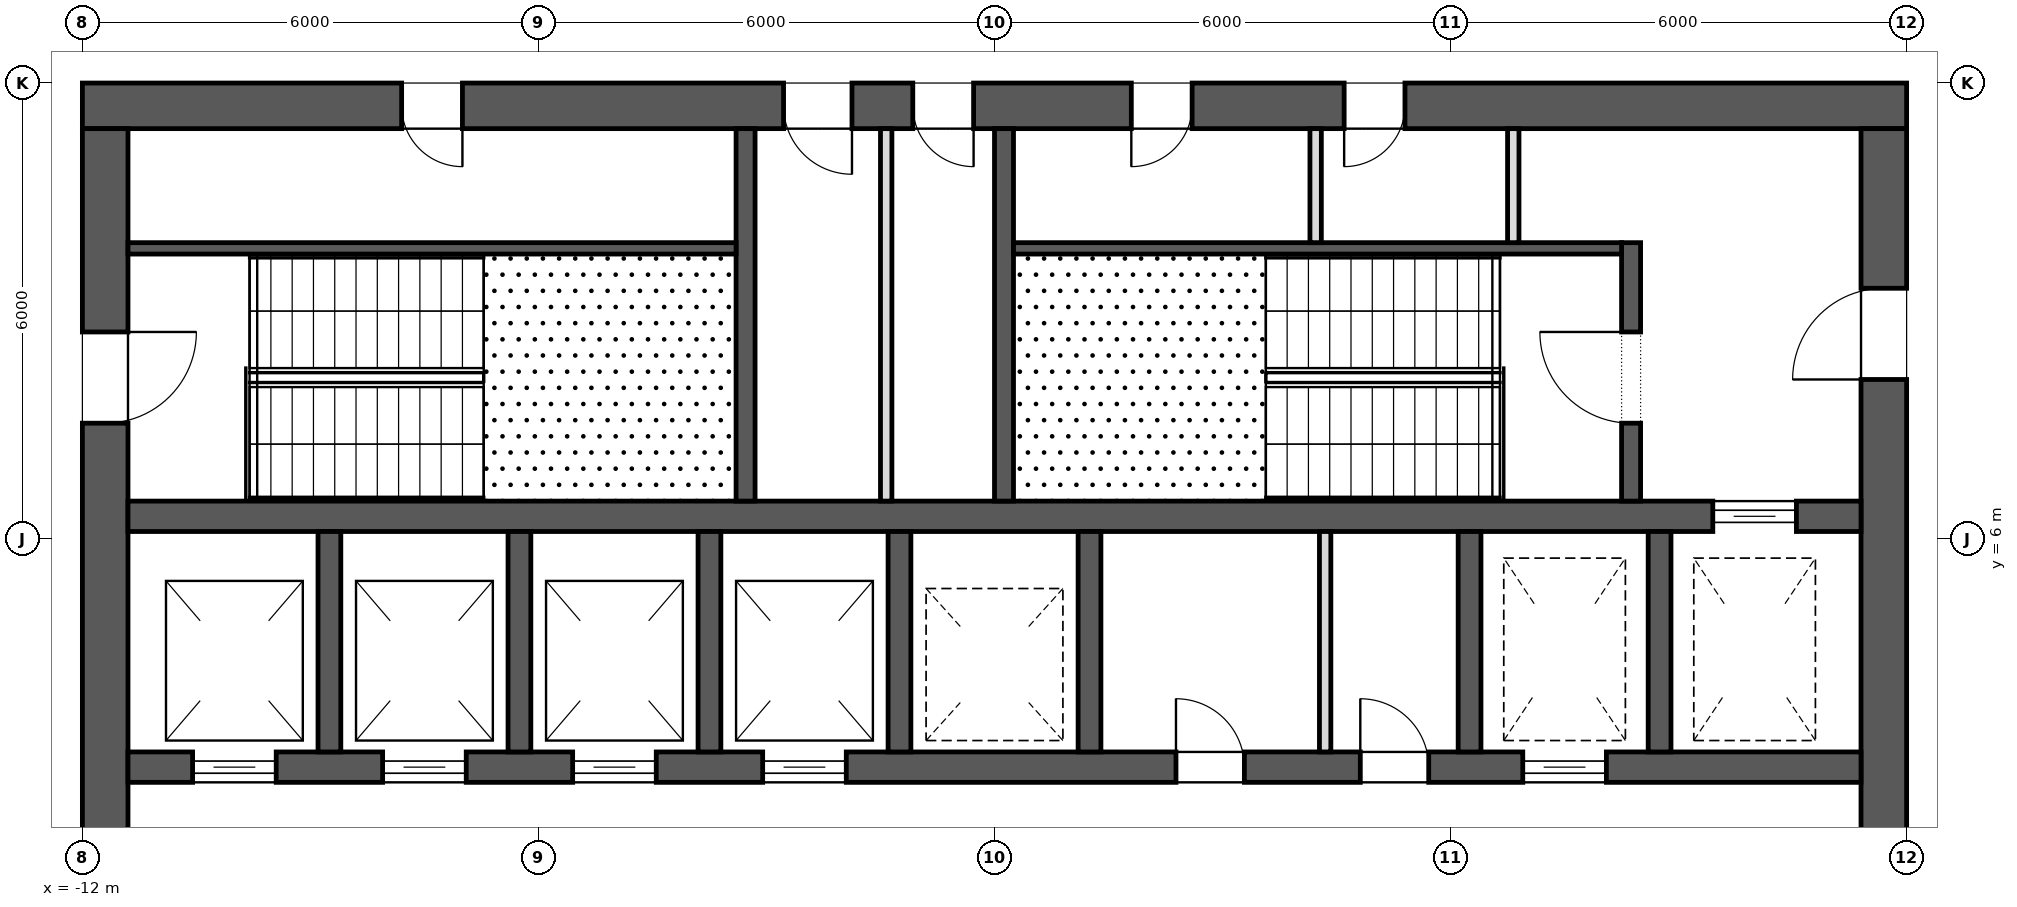
"""IFC4 building model, lengths in metres.
Left out: names, types, materials, properties, quantities, classifications, styles, units other than length and angle.
Written with IfcOpenShell. Run it as: python <this file> out.ifc"""

import sys

from ifc_helpers import new_model, si_unit, direction, frame, frame_2d, origin, place, context, subcontext, project, spatial, rectangle, extrude, element, fill, save


model = new_model("IFC4")
c1 = context("Model", 3, precision=1e-05, world=origin(), true_north=direction((0.0, 1.0)))
c2 = subcontext(c1, "Body", "Model", "MODEL_VIEW")
j1 = project(units=[si_unit("LENGTHUNIT", "METRE"), si_unit("PLANEANGLEUNIT", "RADIAN")], contexts=[c1])
p1 = place(None, origin())
s1 = spatial("IfcSite", under=j1, at=p1, CompositionType="ELEMENT")
p2 = place(p1, origin())
s2 = spatial("IfcBuilding", under=s1, at=p2, CompositionType="ELEMENT")
p3 = place(p2, frame((0.0, 0.0, 226.9)))
s3 = spatial("IfcBuildingStorey", under=s2, at=p3, CompositionType="ELEMENT", Elevation=226.9)
p4 = place(p3, frame((-12.0, 11.7, 0.0), z_axis=(0.0, 0.0, 1.0), x_axis=(1.0, 0.0, 0.0)))
e1 = element("IfcWall", 1, at=p4, inside=s3, PredefinedType="SHEAR", context=c2, shape_type="SweptSolid", body=[
    extrude(rectangle(XDim=24.0, YDim=0.6, at=frame_2d((12.0, 0.0))), origin(), (0.0, 0.0, 1.0), 4.0),
])
p5 = place(p4, frame((9.225, 0.0, 0.0)))
e2 = element("IfcOpeningElement", 2, at=p5, cuts=e1, PredefinedType="OPENING", context=c2, shape_type="SweptSolid", body=[
    extrude(rectangle(XDim=0.9, YDim=2.1, at=frame_2d((0.45, 1.05))), frame((0.0, 0.312, 0.0), z_axis=(0.0, -1.0, 0.0), x_axis=(1.0, 0.0, 0.0)), (0.0, 0.0, 1.0), 0.624),
])
p6 = place(p4, frame((10.925, 0.0, 0.0)))
e3 = element("IfcOpeningElement", 3, at=p6, cuts=e1, PredefinedType="OPENING", context=c2, shape_type="SweptSolid", body=[
    extrude(rectangle(XDim=0.8, YDim=2.1, at=frame_2d((0.4, 1.05))), frame((0.0, 0.312, 0.0), z_axis=(0.0, -1.0, 0.0), x_axis=(1.0, 0.0, 0.0)), (0.0, 0.0, 1.0), 0.624),
])
p7 = place(p4, frame((4.2, 0.0, 0.0)))
e4 = element("IfcOpeningElement", 4, at=p7, cuts=e1, PredefinedType="OPENING", context=c2, shape_type="SweptSolid", body=[
    extrude(rectangle(XDim=0.8, YDim=2.1, at=frame_2d((0.4, 1.05))), frame((0.0, 0.312, 0.0), z_axis=(0.0, -1.0, 0.0), x_axis=(1.0, 0.0, 0.0)), (0.0, 0.0, 1.0), 0.624),
])
p8 = place(p4, frame((13.8, 0.0, 0.0)))
e5 = element("IfcOpeningElement", 5, at=p8, cuts=e1, PredefinedType="OPENING", context=c2, shape_type="SweptSolid", body=[
    extrude(rectangle(XDim=0.8, YDim=2.1, at=frame_2d((0.4, 1.05))), frame((0.0, 0.312, 0.0), z_axis=(0.0, -1.0, 0.0), x_axis=(1.0, 0.0, 0.0)), (0.0, 0.0, 1.0), 0.624),
])
p9 = place(p4, frame((16.6, 0.0, 0.0)))
e6 = element("IfcOpeningElement", 6, at=p9, cuts=e1, PredefinedType="OPENING", context=c2, shape_type="SweptSolid", body=[
    extrude(rectangle(XDim=0.8, YDim=2.1, at=frame_2d((0.4, 1.05))), frame((0.0, 0.312, 0.0), z_axis=(0.0, -1.0, 0.0), x_axis=(1.0, 0.0, 0.0)), (0.0, 0.0, 1.0), 0.624),
])
p10 = place(p3, frame((11.7, -11.4, 0.0), z_axis=(0.0, 0.0, 1.0), x_axis=(0.0, 1.0, 0.0)))
e7 = element("IfcWall", 7, at=p10, inside=s3, PredefinedType="SHEAR", context=c2, shape_type="SweptSolid", body=[
    extrude(rectangle(XDim=22.8, YDim=0.6, at=frame_2d((11.4, 0.0))), origin(), (0.0, 0.0, 1.0), 4.0),
])
p11 = place(p10, frame((10.2, 0.0, 0.0)))
e8 = element("IfcOpeningElement", 8, at=p11, cuts=e7, PredefinedType="OPENING", context=c2, shape_type="SweptSolid", body=[
    extrude(rectangle(XDim=2.4, YDim=2.1, at=frame_2d((1.2, 1.05))), frame((0.0, 0.312, 0.0), z_axis=(0.0, -1.0, 0.0), x_axis=(1.0, 0.0, 0.0)), (0.0, 0.0, 1.0), 0.624),
])
p12 = place(p10, frame((19.5, 0.0, 0.0)))
e9 = element("IfcOpeningElement", 9, at=p12, cuts=e7, PredefinedType="OPENING", context=c2, shape_type="SweptSolid", body=[
    extrude(rectangle(XDim=1.2, YDim=2.1, at=frame_2d((0.6, 1.05))), frame((0.0, 0.312, 0.0), z_axis=(0.0, -1.0, 0.0), x_axis=(1.0, 0.0, 0.0)), (0.0, 0.0, 1.0), 0.624),
])
p13 = place(p10, frame((2.1, 0.0, 0.0)))
e10 = element("IfcOpeningElement", 10, at=p13, cuts=e7, PredefinedType="OPENING", context=c2, shape_type="SweptSolid", body=[
    extrude(rectangle(XDim=1.2, YDim=2.1, at=frame_2d((0.6, 1.05))), frame((0.0, 0.312, 0.0), z_axis=(0.0, -1.0, 0.0), x_axis=(1.0, 0.0, 0.0)), (0.0, 0.0, 1.0), 0.624),
])
p14 = place(p3, frame((-11.7, -11.4, 0.0), z_axis=(0.0, 0.0, 1.0), x_axis=(0.0, 1.0, 0.0)))
e11 = element("IfcWall", 11, at=p14, inside=s3, PredefinedType="SHEAR", context=c2, shape_type="SweptSolid", body=[
    extrude(rectangle(XDim=22.8, YDim=0.6, at=frame_2d((11.4, 0.0))), origin(), (0.0, 0.0, 1.0), 4.0),
])
p15 = place(p14, frame((10.2, 0.0, 0.0)))
e12 = element("IfcOpeningElement", 12, at=p15, cuts=e11, PredefinedType="OPENING", context=c2, shape_type="SweptSolid", body=[
    extrude(rectangle(XDim=2.4, YDim=2.1, at=frame_2d((1.2, 1.05))), frame((0.0, 0.312, 0.0), z_axis=(0.0, -1.0, 0.0), x_axis=(1.0, 0.0, 0.0)), (0.0, 0.0, 1.0), 0.624),
])
p16 = place(p14, frame((18.925, 0.0, 0.0)))
e13 = element("IfcOpeningElement", 13, at=p16, cuts=e11, PredefinedType="OPENING", context=c2, shape_type="SweptSolid", body=[
    extrude(rectangle(XDim=1.2, YDim=2.1, at=frame_2d((0.6, 1.05))), frame((0.0, 0.312, 0.0), z_axis=(0.0, -1.0, 0.0), x_axis=(1.0, 0.0, 0.0)), (0.0, 0.0, 1.0), 0.624),
])
p17 = place(p14, frame((2.675, 0.0, 0.0)))
e14 = element("IfcOpeningElement", 14, at=p17, cuts=e11, PredefinedType="OPENING", context=c2, shape_type="SweptSolid", body=[
    extrude(rectangle(XDim=1.2, YDim=2.1, at=frame_2d((0.6, 1.05))), frame((0.0, 0.312, 0.0), z_axis=(0.0, -1.0, 0.0), x_axis=(1.0, 0.0, 0.0)), (0.0, 0.0, 1.0), 0.624),
])
p18 = place(p3, frame((-11.4, 3.0, 0.0), z_axis=(0.0, 0.0, 1.0), x_axis=(1.0, 0.0, 0.0)))
e15 = element("IfcWall", 15, at=p18, inside=s3, PredefinedType="SHEAR", context=c2, shape_type="SweptSolid", body=[
    extrude(rectangle(XDim=22.8, YDim=0.4, at=frame_2d((11.4, 0.0))), origin(), (0.0, 0.0, 1.0), 4.0),
])
p19 = place(p18, frame((0.85, 0.0, 0.0)))
e16 = element("IfcOpeningElement", 16, at=p19, cuts=e15, PredefinedType="OPENING", context=c2, shape_type="SweptSolid", body=[
    extrude(rectangle(XDim=1.1, YDim=2.1, at=frame_2d((0.55, 1.05))), frame((0.0, 0.212, 0.0), z_axis=(0.0, -1.0, 0.0), x_axis=(1.0, 0.0, 0.0)), (0.0, 0.0, 1.0), 0.424),
])
p20 = place(p18, frame((3.35, 0.0, 0.0)))
e17 = element("IfcOpeningElement", 17, at=p20, cuts=e15, PredefinedType="OPENING", context=c2, shape_type="SweptSolid", body=[
    extrude(rectangle(XDim=1.1, YDim=2.1, at=frame_2d((0.55, 1.05))), frame((0.0, 0.212, 0.0), z_axis=(0.0, -1.0, 0.0), x_axis=(1.0, 0.0, 0.0)), (0.0, 0.0, 1.0), 0.424),
])
p21 = place(p18, frame((5.85, 0.0, 0.0)))
e18 = element("IfcOpeningElement", 18, at=p21, cuts=e15, PredefinedType="OPENING", context=c2, shape_type="SweptSolid", body=[
    extrude(rectangle(XDim=1.1, YDim=2.1, at=frame_2d((0.55, 1.05))), frame((0.0, 0.212, 0.0), z_axis=(0.0, -1.0, 0.0), x_axis=(1.0, 0.0, 0.0)), (0.0, 0.0, 1.0), 0.424),
])
p22 = place(p18, frame((8.35, 0.0, 0.0)))
e19 = element("IfcOpeningElement", 19, at=p22, cuts=e15, PredefinedType="OPENING", context=c2, shape_type="SweptSolid", body=[
    extrude(rectangle(XDim=1.1, YDim=2.1, at=frame_2d((0.55, 1.05))), frame((0.0, 0.212, 0.0), z_axis=(0.0, -1.0, 0.0), x_axis=(1.0, 0.0, 0.0)), (0.0, 0.0, 1.0), 0.424),
])
p23 = place(p18, frame((18.35, 0.0, 0.0)))
e20 = element("IfcOpeningElement", 20, at=p23, cuts=e15, PredefinedType="OPENING", context=c2, shape_type="SweptSolid", body=[
    extrude(rectangle(XDim=1.1, YDim=2.1, at=frame_2d((0.55, 1.05))), frame((0.0, 0.212, 0.0), z_axis=(0.0, -1.0, 0.0), x_axis=(1.0, 0.0, 0.0)), (0.0, 0.0, 1.0), 0.424),
])
p24 = place(p18, frame((13.788, 0.0, 0.0)))
e21 = element("IfcOpeningElement", 21, at=p24, cuts=e15, PredefinedType="OPENING", context=c2, shape_type="SweptSolid", body=[
    extrude(rectangle(XDim=0.9, YDim=2.1, at=frame_2d((0.45, 1.05))), frame((0.0, 0.212, 0.0), z_axis=(0.0, -1.0, 0.0), x_axis=(1.0, 0.0, 0.0)), (0.0, 0.0, 1.0), 0.424),
])
p25 = place(p18, frame((16.212, 0.0, 0.0)))
e22 = element("IfcOpeningElement", 22, at=p25, cuts=e15, PredefinedType="OPENING", context=c2, shape_type="SweptSolid", body=[
    extrude(rectangle(XDim=0.9, YDim=2.1, at=frame_2d((0.45, 1.05))), frame((0.0, 0.212, 0.0), z_axis=(0.0, -1.0, 0.0), x_axis=(1.0, 0.0, 0.0)), (0.0, 0.0, 1.0), 0.424),
])
p26 = place(p3, frame((-11.4, 6.3, 0.0), z_axis=(0.0, 0.0, 1.0), x_axis=(1.0, 0.0, 0.0)))
e23 = element("IfcWall", 23, at=p26, inside=s3, PredefinedType="SHEAR", context=c2, shape_type="SweptSolid", body=[
    extrude(rectangle(XDim=22.8, YDim=0.4, at=frame_2d((11.4, 0.0))), origin(), (0.0, 0.0, 1.0), 4.0),
])
p27 = place(p26, frame((20.85, 0.0, 0.0)))
e24 = element("IfcOpeningElement", 24, at=p27, cuts=e23, PredefinedType="OPENING", context=c2, shape_type="SweptSolid", body=[
    extrude(rectangle(XDim=1.1, YDim=2.1, at=frame_2d((0.55, 1.05))), frame((0.0, 0.212, 0.0), z_axis=(0.0, -1.0, 0.0), x_axis=(1.0, 0.0, 0.0)), (0.0, 0.0, 1.0), 0.424),
])
for number, where, z_axis, x_axis in (
    (25, (-8.75, 3.2, 0.0), (0.0, 0.0, 1.0), (0.0, 1.0, 0.0)),
    (26, (-6.25, 3.2, 0.0), (0.0, 0.0, 1.0), (0.0, 1.0, 0.0)),
    (27, (-3.75, 3.2, 0.0), (0.0, 0.0, 1.0), (0.0, 1.0, 0.0)),
    (28, (-1.25, 3.2, 0.0), (0.0, 0.0, 1.0), (0.0, 1.0, 0.0)),
    (29, (1.25, 3.2, 0.0), (0.0, 0.0, 1.0), (0.0, 1.0, 0.0)),
    (30, (6.25, 3.2, 0.0), (0.0, 0.0, 1.0), (0.0, 1.0, 0.0)),
    (31, (8.75, 3.2, 0.0), (0.0, 0.0, 1.0), (0.0, 1.0, 0.0)),
):
    element("IfcWall", number, at=place(p3, frame(where, z_axis=z_axis, x_axis=x_axis)), inside=s3, PredefinedType="SHEAR", context=c2, shape_type="SweptSolid", body=[
        extrude(rectangle(XDim=2.9, YDim=0.3, at=frame_2d((1.45, 0.0))), origin(), (0.0, 0.0, 1.0), 4.0),
    ])
for number, where, z_axis, x_axis in (
    (32, (-3.275, 6.5, 0.0), (0.0, 0.0, 1.0), (0.0, 1.0, 0.0)),
    (33, (0.125, 6.5, 0.0), (0.0, 0.0, 1.0), (0.0, 1.0, 0.0)),
):
    element("IfcWall", number, at=place(p3, frame(where, z_axis=z_axis, x_axis=x_axis)), inside=s3, PredefinedType="SHEAR", context=c2, shape_type="SweptSolid", body=[
        extrude(rectangle(XDim=4.9, YDim=0.25, at=frame_2d((2.45, 0.0))), origin(), (0.0, 0.0, 1.0), 3.7),
    ])
p28 = place(p3, frame((8.375, 6.5, 0.0), z_axis=(0.0, 0.0, 1.0), x_axis=(0.0, 1.0, 0.0)))
e34 = element("IfcWall", 34, at=p28, inside=s3, PredefinedType="SHEAR", context=c2, shape_type="SweptSolid", body=[
    extrude(rectangle(XDim=3.4, YDim=0.25, at=frame_2d((1.7, 0.0))), origin(), (0.0, 0.0, 1.0), 3.7),
])
p29 = place(p28, frame((1.025, 0.0, 0.0)))
e35 = element("IfcOpeningElement", 35, at=p29, cuts=e34, PredefinedType="OPENING", context=c2, shape_type="SweptSolid", body=[
    extrude(rectangle(XDim=1.2, YDim=2.1, at=frame_2d((0.6, 1.05))), frame((0.0, 0.137, 0.0), z_axis=(0.0, -1.0, 0.0), x_axis=(1.0, 0.0, 0.0)), (0.0, 0.0, 1.0), 0.274),
])
for number, where, z_axis, x_axis in (
    (36, (-11.4, 9.825, 0.0), (0.0, 0.0, 1.0), (1.0, 0.0, 0.0)),
    (37, (0.25, 9.825, 0.0), (0.0, 0.0, 1.0), (1.0, 0.0, 0.0)),
):
    element("IfcWall", number, at=place(p3, frame(where, z_axis=z_axis, x_axis=x_axis)), inside=s3, PredefinedType="SHEAR", context=c2, shape_type="SweptSolid", body=[
        extrude(rectangle(XDim=8.0, YDim=0.15, at=frame_2d((4.0, 0.0))), origin(), (0.0, 0.0, 1.0), 3.7),
    ])
p30 = place(p3, frame((-1.425, 6.5, 0.0), z_axis=(0.0, 0.0, 1.0), x_axis=(0.0, 1.0, 0.0)))
e38 = element("IfcWall", 38, at=p30, inside=s3, PredefinedType="PARTITIONING", context=c2, shape_type="SweptSolid", body=[
    extrude(rectangle(XDim=4.9, YDim=0.15, at=frame_2d((2.45, 0.0))), origin(), (0.0, 0.0, 1.0), 3.7),
])
for number, where, z_axis, x_axis in (
    (39, (4.225, 9.9, 0.0), (0.0, 0.0, 1.0), (0.0, 1.0, 0.0)),
    (40, (6.825, 9.9, 0.0), (0.0, 0.0, 1.0), (0.0, 1.0, 0.0)),
):
    element("IfcWall", number, at=place(p3, frame(where, z_axis=z_axis, x_axis=x_axis)), inside=s3, PredefinedType="PARTITIONING", context=c2, shape_type="SweptSolid", body=[
        extrude(rectangle(XDim=1.5, YDim=0.15, at=frame_2d((0.75, 0.0))), origin(), (0.0, 0.0, 1.0), 3.7),
    ])
p31 = place(p3, frame((4.35, 3.2, 0.0), z_axis=(0.0, 0.0, 1.0), x_axis=(0.0, 1.0, 0.0)))
e41 = element("IfcWall", 41, at=p31, inside=s3, PredefinedType="PARTITIONING", context=c2, shape_type="SweptSolid", body=[
    extrude(rectangle(XDim=2.9, YDim=0.15, at=frame_2d((1.45, 0.0))), origin(), (0.0, 0.0, 1.0), 3.7),
])
p32 = place(p27, origin())
e42 = element("IfcDoor", 42, at=p32, inside=s3, OperationType="SLIDING_TO_LEFT", PredefinedType="DOOR", context=c2, shape_type="SweptSolid", body=[
    extrude(rectangle(XDim=1.1, YDim=2.1, at=frame_2d((0.55, 1.05))), frame((0.0, 0.025, 0.0), z_axis=(0.0, -1.0, 0.0), x_axis=(1.0, 0.0, 0.0)), (0.0, 0.0, 1.0), 0.05),
])
fill(e24, e42)
p33 = place(p19, origin())
e43 = element("IfcDoor", 43, at=p33, inside=s3, OperationType="SLIDING_TO_LEFT", PredefinedType="DOOR", context=c2, shape_type="SweptSolid", body=[
    extrude(rectangle(XDim=1.1, YDim=2.1, at=frame_2d((0.55, 1.05))), frame((0.0, 0.025, 0.0), z_axis=(0.0, -1.0, 0.0), x_axis=(1.0, 0.0, 0.0)), (0.0, 0.0, 1.0), 0.05),
])
fill(e16, e43)
p34 = place(p20, origin())
e44 = element("IfcDoor", 44, at=p34, inside=s3, OperationType="SLIDING_TO_LEFT", PredefinedType="DOOR", context=c2, shape_type="SweptSolid", body=[
    extrude(rectangle(XDim=1.1, YDim=2.1, at=frame_2d((0.55, 1.05))), frame((0.0, 0.025, 0.0), z_axis=(0.0, -1.0, 0.0), x_axis=(1.0, 0.0, 0.0)), (0.0, 0.0, 1.0), 0.05),
])
fill(e17, e44)
p35 = place(p21, origin())
e45 = element("IfcDoor", 45, at=p35, inside=s3, OperationType="SLIDING_TO_LEFT", PredefinedType="DOOR", context=c2, shape_type="SweptSolid", body=[
    extrude(rectangle(XDim=1.1, YDim=2.1, at=frame_2d((0.55, 1.05))), frame((0.0, 0.025, 0.0), z_axis=(0.0, -1.0, 0.0), x_axis=(1.0, 0.0, 0.0)), (0.0, 0.0, 1.0), 0.05),
])
fill(e18, e45)
p36 = place(p22, origin())
e46 = element("IfcDoor", 46, at=p36, inside=s3, OperationType="SLIDING_TO_LEFT", PredefinedType="DOOR", context=c2, shape_type="SweptSolid", body=[
    extrude(rectangle(XDim=1.1, YDim=2.1, at=frame_2d((0.55, 1.05))), frame((0.0, 0.025, 0.0), z_axis=(0.0, -1.0, 0.0), x_axis=(1.0, 0.0, 0.0)), (0.0, 0.0, 1.0), 0.05),
])
fill(e19, e46)
p37 = place(p23, origin())
e47 = element("IfcDoor", 47, at=p37, inside=s3, OperationType="SLIDING_TO_LEFT", PredefinedType="DOOR", context=c2, shape_type="SweptSolid", body=[
    extrude(rectangle(XDim=1.1, YDim=2.1, at=frame_2d((0.55, 1.05))), frame((0.0, 0.025, 0.0), z_axis=(0.0, -1.0, 0.0), x_axis=(1.0, 0.0, 0.0)), (0.0, 0.0, 1.0), 0.05),
])
fill(e20, e47)
p38 = place(p16, frame((1.2, 0.0, 0.0), z_axis=(0.0, 0.0, 1.0), x_axis=(-1.0, 0.0, 0.0)))
e48 = element("IfcDoor", 48, at=p38, inside=s3, OperationType="SINGLE_SWING_RIGHT", PredefinedType="DOOR", context=c2, shape_type="SweptSolid", body=[
    extrude(rectangle(XDim=1.2, YDim=2.1, at=frame_2d((0.6, 1.05))), frame((0.0, 0.025, 0.0), z_axis=(0.0, -1.0, 0.0), x_axis=(1.0, 0.0, 0.0)), (0.0, 0.0, 1.0), 0.05),
])
fill(e13, e48)
p39 = place(p29, origin())
e49 = element("IfcDoor", 49, at=p39, inside=s3, OperationType="SINGLE_SWING_LEFT", PredefinedType="DOOR", context=c2, shape_type="SweptSolid", body=[
    extrude(rectangle(XDim=1.2, YDim=2.1, at=frame_2d((0.6, 1.05))), frame((0.0, 0.025, 0.0), z_axis=(0.0, -1.0, 0.0), x_axis=(1.0, 0.0, 0.0)), (0.0, 0.0, 1.0), 0.05),
])
fill(e35, e49)
p40 = place(p12, origin())
e50 = element("IfcDoor", 50, at=p40, inside=s3, OperationType="SINGLE_SWING_RIGHT", PredefinedType="DOOR", context=c2, shape_type="SweptSolid", body=[
    extrude(rectangle(XDim=1.2, YDim=2.1, at=frame_2d((0.6, 1.05))), frame((0.0, 0.025, 0.0), z_axis=(0.0, -1.0, 0.0), x_axis=(1.0, 0.0, 0.0)), (0.0, 0.0, 1.0), 0.05),
])
fill(e9, e50)
p41 = place(p5, frame((0.9, 0.0, 0.0), z_axis=(0.0, 0.0, 1.0), x_axis=(-1.0, 0.0, 0.0)))
e51 = element("IfcDoor", 51, at=p41, inside=s3, OperationType="SINGLE_SWING_RIGHT", PredefinedType="DOOR", context=c2, shape_type="SweptSolid", body=[
    extrude(rectangle(XDim=0.9, YDim=2.1, at=frame_2d((0.45, 1.05))), frame((0.0, 0.025, 0.0), z_axis=(0.0, -1.0, 0.0), x_axis=(1.0, 0.0, 0.0)), (0.0, 0.0, 1.0), 0.05),
])
fill(e2, e51)
p42 = place(p6, frame((0.8, 0.0, 0.0), z_axis=(0.0, 0.0, 1.0), x_axis=(-1.0, 0.0, 0.0)))
e52 = element("IfcDoor", 52, at=p42, inside=s3, OperationType="SINGLE_SWING_RIGHT", PredefinedType="DOOR", context=c2, shape_type="SweptSolid", body=[
    extrude(rectangle(XDim=0.8, YDim=2.1, at=frame_2d((0.4, 1.05))), frame((0.0, 0.025, 0.0), z_axis=(0.0, -1.0, 0.0), x_axis=(1.0, 0.0, 0.0)), (0.0, 0.0, 1.0), 0.05),
])
fill(e3, e52)
p43 = place(p7, frame((0.8, 0.0, 0.0), z_axis=(0.0, 0.0, 1.0), x_axis=(-1.0, 0.0, 0.0)))
e53 = element("IfcDoor", 53, at=p43, inside=s3, OperationType="SINGLE_SWING_RIGHT", PredefinedType="DOOR", context=c2, shape_type="SweptSolid", body=[
    extrude(rectangle(XDim=0.8, YDim=2.1, at=frame_2d((0.4, 1.05))), frame((0.0, 0.025, 0.0), z_axis=(0.0, -1.0, 0.0), x_axis=(1.0, 0.0, 0.0)), (0.0, 0.0, 1.0), 0.05),
])
fill(e4, e53)
p44 = place(p8, frame((0.8, 0.0, 0.0), z_axis=(0.0, 0.0, 1.0), x_axis=(-1.0, 0.0, 0.0)))
e54 = element("IfcDoor", 54, at=p44, inside=s3, OperationType="SINGLE_SWING_LEFT", PredefinedType="DOOR", context=c2, shape_type="SweptSolid", body=[
    extrude(rectangle(XDim=0.8, YDim=2.1, at=frame_2d((0.4, 1.05))), frame((0.0, 0.025, 0.0), z_axis=(0.0, -1.0, 0.0), x_axis=(1.0, 0.0, 0.0)), (0.0, 0.0, 1.0), 0.05),
])
fill(e5, e54)
p45 = place(p9, frame((0.8, 0.0, 0.0), z_axis=(0.0, 0.0, 1.0), x_axis=(-1.0, 0.0, 0.0)))
e55 = element("IfcDoor", 55, at=p45, inside=s3, OperationType="SINGLE_SWING_LEFT", PredefinedType="DOOR", context=c2, shape_type="SweptSolid", body=[
    extrude(rectangle(XDim=0.8, YDim=2.1, at=frame_2d((0.4, 1.05))), frame((0.0, 0.025, 0.0), z_axis=(0.0, -1.0, 0.0), x_axis=(1.0, 0.0, 0.0)), (0.0, 0.0, 1.0), 0.05),
])
fill(e6, e55)
p46 = place(p24, origin())
e56 = element("IfcDoor", 56, at=p46, inside=s3, OperationType="SINGLE_SWING_RIGHT", PredefinedType="DOOR", context=c2, shape_type="SweptSolid", body=[
    extrude(rectangle(XDim=0.9, YDim=2.1, at=frame_2d((0.45, 1.05))), frame((0.0, 0.025, 0.0), z_axis=(0.0, -1.0, 0.0), x_axis=(1.0, 0.0, 0.0)), (0.0, 0.0, 1.0), 0.05),
])
fill(e21, e56)
p47 = place(p25, origin())
e57 = element("IfcDoor", 57, at=p47, inside=s3, OperationType="SINGLE_SWING_RIGHT", PredefinedType="DOOR", context=c2, shape_type="SweptSolid", body=[
    extrude(rectangle(XDim=0.9, YDim=2.1, at=frame_2d((0.45, 1.05))), frame((0.0, 0.025, 0.0), z_axis=(0.0, -1.0, 0.0), x_axis=(1.0, 0.0, 0.0)), (0.0, 0.0, 1.0), 0.05),
])
fill(e22, e57)
save(model, sys.argv[1])
